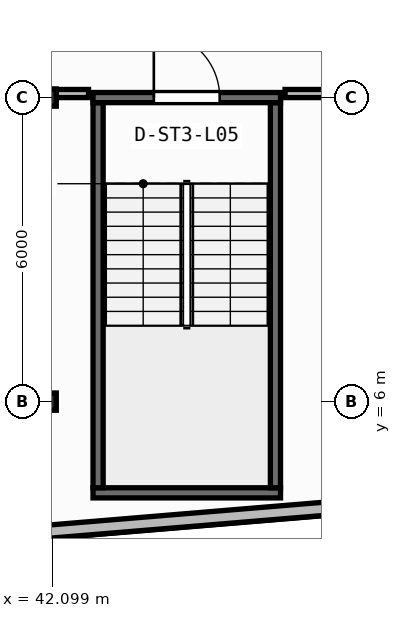
"""IFC4 building model, lengths in metres.
Left out: names, types, materials, properties, quantities, classifications, styles, units other than length and angle.
Written with IfcOpenShell. Run it as: python <this file> out.ifc"""

import sys

from ifc_helpers import new_model, si_unit, direction, frame, frame_2d, origin, origin_2d, place, context, subcontext, project, spatial, rectangle, i_section, extrude, element, fill, save


model = new_model("IFC4")
c1 = context("Model", 3, precision=1e-05, world=origin(), true_north=direction((0.0, 1.0)))
c2 = subcontext(c1, "Body", "Model", "MODEL_VIEW")
j1 = project(units=[si_unit("LENGTHUNIT", "METRE"), si_unit("PLANEANGLEUNIT", "RADIAN")], contexts=[c1])
p1 = place(None, origin())
s1 = spatial("IfcSite", under=j1, at=p1, CompositionType="ELEMENT")
p2 = place(p1, origin())
s2 = spatial("IfcBuilding", under=s1, at=p2, CompositionType="ELEMENT")
p3 = place(p2, frame((0.0, 0.0, 22.5)))
s3 = spatial("IfcBuildingStorey", under=s2, at=p3, CompositionType="ELEMENT", Elevation=22.5)
for number, where, z_axis, x_axis in (
    (1, (42.0, 6.0, 0.0), (0.0, 0.0, 1.0), (1.0, 0.0, 0.0)),
    (2, (42.0, 12.0, 0.0), (0.0, 0.0, 1.0), (1.0, 0.0, 0.0)),
):
    element("IfcColumn", number, at=place(p3, frame(where, z_axis=z_axis, x_axis=x_axis)), inside=s3, PredefinedType="COLUMN", context=c2, shape_type="SweptSolid", body=[
        extrude(i_section(OverallWidth=0.35, OverallDepth=0.34, WebThickness=0.016, FlangeThickness=0.028, at=origin_2d()), origin(), (0.0, 0.0, 1.0), 3.95),
    ])
p4 = place(p3, frame((2.76, 0.174, 0.0), z_axis=(0.0, 0.0, 1.0), x_axis=(0.996571478456, 0.082736257641, 0.0)))
e3 = element("IfcWall", 3, at=p4, inside=s3, PredefinedType="STANDARD", context=c2, shape_type="SweptSolid", body=[
    extrude(rectangle(XDim=52.861, YDim=0.26, at=frame_2d((26.431, 0.0))), origin(), (0.0, 0.0, 1.0), 3.71),
])
p5 = place(p4, frame((25.231, 0.0, 0.9)))
e4 = element("IfcOpeningElement", 4, at=p5, cuts=e3, PredefinedType="OPENING", context=c2, shape_type="SweptSolid", body=[
    extrude(rectangle(XDim=2.4, YDim=1.65, at=frame_2d((1.2, 0.825))), frame((0.0, 0.14, 0.0), z_axis=(0.0, -1.0, 0.0), x_axis=(1.0, 0.0, 0.0)), (0.0, 0.0, 1.0), 0.28),
])
p6 = place(p3, frame((42.9, 4.2, 0.0), z_axis=(0.0, 0.0, 1.0), x_axis=(1.0, 0.0, 0.0)))
e5 = element("IfcWall", 5, at=p6, inside=s3, PredefinedType="SHEAR", context=c2, shape_type="SweptSolid", body=[
    extrude(rectangle(XDim=3.7, YDim=0.2, at=frame_2d((1.85, 0.0))), origin(), (0.0, 0.0, 1.0), 3.71),
])
for number, where, z_axis, x_axis in (
    (6, (43.0, 4.3, 0.0), (0.0, 0.0, 1.0), (0.0, 1.0, 0.0)),
    (7, (46.5, 4.3, 0.0), (0.0, 0.0, 1.0), (0.0, 1.0, 0.0)),
):
    element("IfcWall", number, at=place(p3, frame(where, z_axis=z_axis, x_axis=x_axis)), inside=s3, PredefinedType="SHEAR", context=c2, shape_type="SweptSolid", body=[
        extrude(rectangle(XDim=7.6, YDim=0.2, at=frame_2d((3.8, 0.0))), origin(), (0.0, 0.0, 1.0), 3.71),
    ])
p7 = place(p3, frame((42.9, 12.0, 0.0), z_axis=(0.0, 0.0, 1.0), x_axis=(1.0, 0.0, 0.0)))
e8 = element("IfcWall", 8, at=p7, inside=s3, PredefinedType="SHEAR", context=c2, shape_type="SweptSolid", body=[
    extrude(rectangle(XDim=3.7, YDim=0.2, at=frame_2d((1.85, 0.0))), origin(), (0.0, 0.0, 1.0), 3.71),
])
p8 = place(p7, frame((1.2, 0.0, 0.0)))
e9 = element("IfcOpeningElement", 9, at=p8, cuts=e8, PredefinedType="OPENING", context=c2, shape_type="SweptSolid", body=[
    extrude(rectangle(XDim=1.3, YDim=2.15, at=frame_2d((0.65, 1.075))), frame((0.0, 0.11, 0.0), z_axis=(0.0, -1.0, 0.0), x_axis=(1.0, 0.0, 0.0)), (0.0, 0.0, 1.0), 0.22),
])
p9 = place(p3, frame((31.63, 12.08, 0.0), z_axis=(0.0, 0.0, 1.0), x_axis=(1.0, 0.0, 0.0)))
e10 = element("IfcWall", 10, at=p9, inside=s3, PredefinedType="PARTITIONING", context=c2, shape_type="SweptSolid", body=[
    extrude(rectangle(XDim=11.181, YDim=0.16, at=frame_2d((5.59, 0.0))), origin(), (0.0, 0.0, 1.0), 3.073),
])
p10 = place(p3, frame((46.689, 12.08, 0.0), z_axis=(0.0, 0.0, 1.0), x_axis=(1.0, 0.0, 0.0)))
e11 = element("IfcWall", 11, at=p10, inside=s3, PredefinedType="PARTITIONING", context=c2, shape_type="SweptSolid", body=[
    extrude(rectangle(XDim=3.011, YDim=0.16, at=frame_2d((1.505, 0.0))), origin(), (0.0, 0.0, 1.0), 3.073),
])
p11 = place(p8, origin())
e12 = element("IfcDoor", 12, at=p11, inside=s3, OperationType="SINGLE_SWING_LEFT", PredefinedType="DOOR", context=c2, shape_type="SweptSolid", body=[
    extrude(rectangle(XDim=1.3, YDim=2.15, at=frame_2d((0.65, 1.075))), frame((0.0, 0.025, 0.0), z_axis=(0.0, -1.0, 0.0), x_axis=(1.0, 0.0, 0.0)), (0.0, 0.0, 1.0), 0.05),
])
fill(e9, e12)
save(model, sys.argv[1])
